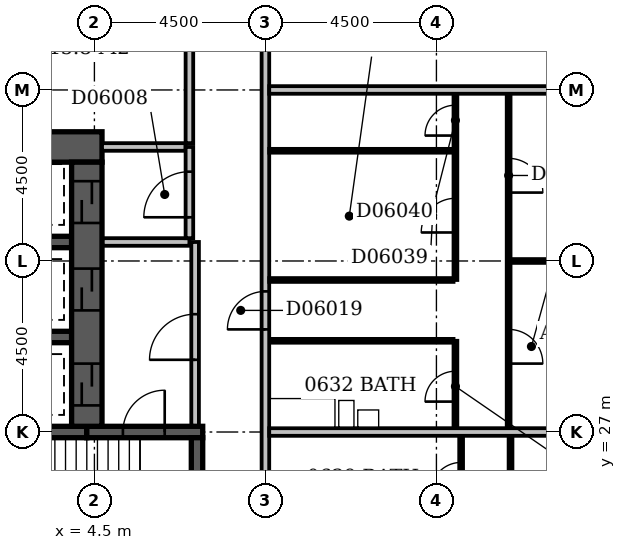
"""IFC4 building model, lengths in metres.
Left out: names, types, materials, properties, quantities, classifications, styles, units other than length and angle.
Written with IfcOpenShell. Run it as: python <this file> out.ifc"""

import sys

from ifc_helpers import new_model, si_unit, direction, frame, frame_2d, origin, place, context, subcontext, project, spatial, rectangle, extrude, element, fill, save


model = new_model("IFC4")
c1 = context("Model", 3, precision=1e-05, world=origin(), true_north=direction((0.0, 1.0)))
c2 = subcontext(c1, "Body", "Model", "MODEL_VIEW")
j1 = project(units=[si_unit("LENGTHUNIT", "METRE"), si_unit("PLANEANGLEUNIT", "RADIAN")], contexts=[c1])
p1 = place(None, origin())
s1 = spatial("IfcSite", under=j1, at=p1, CompositionType="ELEMENT")
p2 = place(p1, origin())
s2 = spatial("IfcBuilding", under=s1, at=p2, CompositionType="ELEMENT")
p3 = place(p2, frame((0.0, 0.0, 32.6)))
s3 = spatial("IfcBuildingStorey", under=s2, at=p3, CompositionType="ELEMENT", Elevation=32.6)
p4 = place(p3, frame((0.1, 34.5, -0.3), z_axis=(0.0, 0.0, 1.0), x_axis=(1.0, 0.0, 0.0)))
e1 = element("IfcWall", 1, at=p4, inside=s3, PredefinedType="SHEAR", context=c2, shape_type="SweptSolid", body=[
    extrude(rectangle(XDim=4.6, YDim=0.8, at=frame_2d((2.3, 0.0))), origin(), (0.0, 0.0, 1.0), 3.6),
])
p5 = place(p3, frame((0.35, 27.0, -0.3), z_axis=(0.0, 0.0, 1.0), x_axis=(1.0, 0.0, 0.0)))
e2 = element("IfcWall", 2, at=p5, inside=s3, PredefinedType="SHEAR", context=c2, shape_type="SweptSolid", body=[
    extrude(rectangle(XDim=3.95, YDim=0.3, at=frame_2d((1.975, 0.0))), origin(), (0.0, 0.0, 1.0), 3.6),
])
for number, where, z_axis, x_axis in (
    (3, (0.9, 29.5, -0.3), (0.0, 0.0, 1.0), (1.0, 0.0, 0.0)),
    (4, (0.9, 32.0, -0.3), (0.0, 0.0, 1.0), (1.0, 0.0, 0.0)),
):
    element("IfcWall", number, at=place(p3, frame(where, z_axis=z_axis, x_axis=x_axis)), inside=s3, PredefinedType="SHEAR", context=c2, shape_type="SweptSolid", body=[
        extrude(rectangle(XDim=3.0, YDim=0.3, at=frame_2d((1.5, 0.0))), origin(), (0.0, 0.0, 1.0), 3.6),
    ])
p6 = place(p3, frame((4.3, 27.0, -0.3), z_axis=(0.0, 0.0, 1.0), x_axis=(1.0, 0.0, 0.0)))
e5 = element("IfcWall", 5, at=p6, inside=s3, PredefinedType="SHEAR", context=c2, shape_type="SweptSolid", body=[
    extrude(rectangle(XDim=3.05, YDim=0.3, at=frame_2d((1.525, 0.0))), origin(), (0.0, 0.0, 1.0), 3.6),
])
p7 = place(p6, frame((0.95, 0.0, 0.3)))
e6 = element("IfcOpeningElement", 6, at=p7, cuts=e5, PredefinedType="OPENING", context=c2, shape_type="SweptSolid", body=[
    extrude(rectangle(XDim=1.1, YDim=2.1, at=frame_2d((0.55, 1.05))), frame((0.0, 0.162, 0.0), z_axis=(0.0, -1.0, 0.0), x_axis=(1.0, 0.0, 0.0)), (0.0, 0.0, 1.0), 0.324),
])
p8 = place(p3, frame((4.3, 27.15, -0.3), z_axis=(0.0, 0.0, 1.0), x_axis=(0.0, 1.0, 0.0)))
e7 = element("IfcWall", 7, at=p8, inside=s3, PredefinedType="SHEAR", context=c2, shape_type="SweptSolid", body=[
    extrude(rectangle(XDim=6.95, YDim=0.8, at=frame_2d((3.475, 0.0))), origin(), (0.0, 0.0, 1.0), 3.6),
])
p9 = place(p8, frame((3.05, 0.0, 0.3)))
e8 = element("IfcOpeningElement", 8, at=p9, cuts=e7, PredefinedType="OPENING", context=c2, shape_type="SweptSolid", body=[
    extrude(rectangle(XDim=1.1, YDim=2.1, at=frame_2d((0.55, 1.05))), frame((0.0, 0.412, 0.0), z_axis=(0.0, -1.0, 0.0), x_axis=(1.0, 0.0, 0.0)), (0.0, 0.0, 1.0), 0.824),
])
p10 = place(p8, frame((0.55, 0.0, 0.3)))
e9 = element("IfcOpeningElement", 9, at=p10, cuts=e7, PredefinedType="OPENING", context=c2, shape_type="SweptSolid", body=[
    extrude(rectangle(XDim=1.1, YDim=2.1, at=frame_2d((0.55, 1.05))), frame((0.0, 0.412, 0.0), z_axis=(0.0, -1.0, 0.0), x_axis=(1.0, 0.0, 0.0)), (0.0, 0.0, 1.0), 0.824),
])
p11 = place(p8, frame((5.35, 0.0, 0.3)))
e10 = element("IfcOpeningElement", 10, at=p11, cuts=e7, PredefinedType="OPENING", context=c2, shape_type="SweptSolid", body=[
    extrude(rectangle(XDim=1.1, YDim=2.1, at=frame_2d((0.55, 1.05))), frame((0.0, 0.412, 0.0), z_axis=(0.0, -1.0, 0.0), x_axis=(1.0, 0.0, 0.0)), (0.0, 0.0, 1.0), 0.824),
])
p12 = place(p3, frame((7.2, 22.65, -0.3), z_axis=(0.0, 0.0, 1.0), x_axis=(0.0, 1.0, 0.0)))
e11 = element("IfcWall", 11, at=p12, inside=s3, PredefinedType="SHEAR", context=c2, shape_type="SweptSolid", body=[
    extrude(rectangle(XDim=4.2, YDim=0.3, at=frame_2d((2.1, 0.0))), origin(), (0.0, 0.0, 1.0), 3.6),
])
p13 = place(p12, frame((0.8, 0.0, 0.3)))
e12 = element("IfcOpeningElement", 12, at=p13, cuts=e11, PredefinedType="OPENING", context=c2, shape_type="SweptSolid", body=[
    extrude(rectangle(XDim=1.1, YDim=2.1, at=frame_2d((0.55, 1.05))), frame((0.0, 0.162, 0.0), z_axis=(0.0, -1.0, 0.0), x_axis=(1.0, 0.0, 0.0)), (0.0, 0.0, 1.0), 0.324),
])
p14 = place(p3, frame((4.72, 32.0, 0.0), z_axis=(0.0, 0.0, 1.0), x_axis=(1.0, 0.0, 0.0)))
e13 = element("IfcWall", 13, at=p14, inside=s3, PredefinedType="PARTITIONING", context=c2, shape_type="SweptSolid", body=[
    extrude(rectangle(XDim=2.28, YDim=0.2, at=frame_2d((1.14, 0.0))), origin(), (0.0, 0.0, 1.0), 3.3),
])
p15 = place(p3, frame((7.0, 32.1, 0.0), z_axis=(0.0, 0.0, 1.0), x_axis=(0.0, 1.0, 0.0)))
e14 = element("IfcWall", 14, at=p15, inside=s3, PredefinedType="PARTITIONING", context=c2, shape_type="SweptSolid", body=[
    extrude(rectangle(XDim=2.4, YDim=0.2, at=frame_2d((1.2, 0.0))), origin(), (0.0, 0.0, 1.0), 3.3),
])
p16 = place(p15, frame((0.55, 0.0, 0.0)))
e15 = element("IfcOpeningElement", 15, at=p16, cuts=e14, PredefinedType="OPENING", context=c2, shape_type="SweptSolid", body=[
    extrude(rectangle(XDim=1.2, YDim=2.1, at=frame_2d((0.6, 1.05))), frame((0.0, 0.112, 0.0), z_axis=(0.0, -1.0, 0.0), x_axis=(1.0, 0.0, 0.0)), (0.0, 0.0, 1.0), 0.224),
])
p17 = place(p3, frame((4.7, 34.5, 0.0), z_axis=(0.0, 0.0, 1.0), x_axis=(1.0, 0.0, 0.0)))
e16 = element("IfcWall", 16, at=p17, inside=s3, PredefinedType="PARTITIONING", context=c2, shape_type="SweptSolid", body=[
    extrude(rectangle(XDim=2.2, YDim=0.2, at=frame_2d((1.1, 0.0))), origin(), (0.0, 0.0, 1.0), 3.3),
])
p18 = place(p3, frame((7.15, 27.17, 0.0), z_axis=(0.0, 0.0, 1.0), x_axis=(0.0, 1.0, 0.0)))
e17 = element("IfcWall", 17, at=p18, inside=s3, PredefinedType="PARTITIONING", context=c2, shape_type="SweptSolid", body=[
    extrude(rectangle(XDim=4.83, YDim=0.2, at=frame_2d((2.415, 0.0))), origin(), (0.0, 0.0, 1.0), 3.3),
])
p19 = place(p18, frame((1.73, 0.0, 0.0)))
e18 = element("IfcOpeningElement", 18, at=p19, cuts=e17, PredefinedType="OPENING", context=c2, shape_type="SweptSolid", body=[
    extrude(rectangle(XDim=1.2, YDim=2.1, at=frame_2d((0.6, 1.05))), frame((0.0, 0.112, 0.0), z_axis=(0.0, -1.0, 0.0), x_axis=(1.0, 0.0, 0.0)), (0.0, 0.0, 1.0), 0.224),
])
p20 = place(p3, frame((9.0, 5.0, 0.0), z_axis=(0.0, 0.0, 1.0), x_axis=(0.0, 1.0, 0.0)))
e19 = element("IfcWall", 19, at=p20, inside=s3, PredefinedType="PARTITIONING", context=c2, shape_type="SweptSolid", body=[
    extrude(rectangle(XDim=44.5, YDim=0.2, at=frame_2d((22.25, 0.0))), origin(), (0.0, 0.0, 1.0), 3.3),
])
p21 = place(p20, frame((24.7, 0.0, 0.0)))
e20 = element("IfcOpeningElement", 20, at=p21, cuts=e19, PredefinedType="OPENING", context=c2, shape_type="SweptSolid", body=[
    extrude(rectangle(XDim=1.0, YDim=2.1, at=frame_2d((0.5, 1.05))), frame((0.0, 0.112, 0.0), z_axis=(0.0, -1.0, 0.0), x_axis=(1.0, 0.0, 0.0)), (0.0, 0.0, 1.0), 0.224),
])
p22 = place(p20, frame((13.3, 0.0, 0.0)))
e21 = element("IfcOpeningElement", 21, at=p22, cuts=e19, PredefinedType="OPENING", context=c2, shape_type="SweptSolid", body=[
    extrude(rectangle(XDim=1.0, YDim=2.1, at=frame_2d((0.5, 1.05))), frame((0.0, 0.112, 0.0), z_axis=(0.0, -1.0, 0.0), x_axis=(1.0, 0.0, 0.0)), (0.0, 0.0, 1.0), 0.224),
])
p23 = place(p20, frame((10.45, 0.0, 0.0)))
e22 = element("IfcOpeningElement", 22, at=p23, cuts=e19, PredefinedType="OPENING", context=c2, shape_type="SweptSolid", body=[
    extrude(rectangle(XDim=1.0, YDim=2.1, at=frame_2d((0.5, 1.05))), frame((0.0, 0.112, 0.0), z_axis=(0.0, -1.0, 0.0), x_axis=(1.0, 0.0, 0.0)), (0.0, 0.0, 1.0), 0.224),
])
p24 = place(p20, frame((5.95, 0.0, 0.0)))
e23 = element("IfcOpeningElement", 23, at=p24, cuts=e19, PredefinedType="OPENING", context=c2, shape_type="SweptSolid", body=[
    extrude(rectangle(XDim=1.0, YDim=2.1, at=frame_2d((0.5, 1.05))), frame((0.0, 0.112, 0.0), z_axis=(0.0, -1.0, 0.0), x_axis=(1.0, 0.0, 0.0)), (0.0, 0.0, 1.0), 0.224),
])
p25 = place(p20, frame((37.25, 0.0, 0.0)))
e24 = element("IfcOpeningElement", 24, at=p25, cuts=e19, PredefinedType="OPENING", context=c2, shape_type="SweptSolid", body=[
    extrude(rectangle(XDim=0.9, YDim=2.1, at=frame_2d((0.45, 1.05))), frame((0.0, 0.112, 0.0), z_axis=(0.0, -1.0, 0.0), x_axis=(1.0, 0.0, 0.0)), (0.0, 0.0, 1.0), 0.224),
])
p26 = place(p20, frame((1.5, 0.0, 0.0)))
e25 = element("IfcOpeningElement", 25, at=p26, cuts=e19, PredefinedType="OPENING", context=c2, shape_type="SweptSolid", body=[
    extrude(rectangle(XDim=0.9, YDim=2.1, at=frame_2d((0.45, 1.05))), frame((0.0, 0.112, 0.0), z_axis=(0.0, -1.0, 0.0), x_axis=(1.0, 0.0, 0.0)), (0.0, 0.0, 1.0), 0.224),
])
p27 = place(p3, frame((15.45, 18.1, 0.0), z_axis=(0.0, 0.0, 1.0), x_axis=(0.0, 1.0, 0.0)))
e26 = element("IfcWall", 26, at=p27, inside=s3, PredefinedType="PARTITIONING", context=c2, shape_type="SweptSolid", body=[
    extrude(rectangle(XDim=8.8, YDim=0.1, at=frame_2d((4.4, 0.0))), origin(), (0.0, 0.0, 1.0), 3.3),
])
p28 = place(p27, frame((1.7, 0.0, 0.0)))
e27 = element("IfcOpeningElement", 27, at=p28, cuts=e26, PredefinedType="OPENING", context=c2, shape_type="SweptSolid", body=[
    extrude(rectangle(XDim=0.9, YDim=2.1, at=frame_2d((0.45, 1.05))), frame((0.0, 0.062, 0.0), z_axis=(0.0, -1.0, 0.0), x_axis=(1.0, 0.0, 0.0)), (0.0, 0.0, 1.0), 0.124),
])
p29 = place(p27, frame((6.2, 0.0, 0.0)))
e28 = element("IfcOpeningElement", 28, at=p29, cuts=e26, PredefinedType="OPENING", context=c2, shape_type="SweptSolid", body=[
    extrude(rectangle(XDim=0.9, YDim=2.1, at=frame_2d((0.45, 1.05))), frame((0.0, 0.062, 0.0), z_axis=(0.0, -1.0, 0.0), x_axis=(1.0, 0.0, 0.0)), (0.0, 0.0, 1.0), 0.124),
])
p30 = place(p3, frame((14.15, 19.6, 0.0), z_axis=(0.0, 0.0, 1.0), x_axis=(0.0, 1.0, 0.0)))
e29 = element("IfcWall", 29, at=p30, inside=s3, PredefinedType="PARTITIONING", context=c2, shape_type="SweptSolid", body=[
    extrude(rectangle(XDim=7.3, YDim=0.1, at=frame_2d((3.65, 0.0))), origin(), (0.0, 0.0, 1.0), 3.3),
])
p31 = place(p30, frame((5.8, 0.0, 0.0)))
e30 = element("IfcOpeningElement", 30, at=p31, cuts=e29, PredefinedType="OPENING", context=c2, shape_type="SweptSolid", body=[
    extrude(rectangle(XDim=0.8, YDim=2.1, at=frame_2d((0.4, 1.05))), frame((0.0, 0.062, 0.0), z_axis=(0.0, -1.0, 0.0), x_axis=(1.0, 0.0, 0.0)), (0.0, 0.0, 1.0), 0.124),
])
p32 = place(p30, frame((2.05, 0.0, 0.0)))
e31 = element("IfcOpeningElement", 31, at=p32, cuts=e29, PredefinedType="OPENING", context=c2, shape_type="SweptSolid", body=[
    extrude(rectangle(XDim=0.9, YDim=2.1, at=frame_2d((0.45, 1.05))), frame((0.0, 0.062, 0.0), z_axis=(0.0, -1.0, 0.0), x_axis=(1.0, 0.0, 0.0)), (0.0, 0.0, 1.0), 0.124),
])
p33 = place(p3, frame((9.1, 27.0, 0.0), z_axis=(0.0, 0.0, 1.0), x_axis=(1.0, 0.0, 0.0)))
e32 = element("IfcWall", 32, at=p33, inside=s3, PredefinedType="PARTITIONING", context=c2, shape_type="SweptSolid", body=[
    extrude(rectangle(XDim=12.8, YDim=0.2, at=frame_2d((6.4, 0.0))), origin(), (0.0, 0.0, 1.0), 2.7),
])
p34 = place(p3, frame((14.0, 27.1, 0.0), z_axis=(0.0, 0.0, 1.0), x_axis=(0.0, 1.0, 0.0)))
e33 = element("IfcWall", 33, at=p34, inside=s3, PredefinedType="PARTITIONING", context=c2, shape_type="SweptSolid", body=[
    extrude(rectangle(XDim=2.3, YDim=0.1, at=frame_2d((1.15, 0.0))), origin(), (0.0, 0.0, 1.0), 3.3),
])
p35 = place(p34, frame((0.7, 0.0, 0.0)))
e34 = element("IfcOpeningElement", 34, at=p35, cuts=e33, PredefinedType="OPENING", context=c2, shape_type="SweptSolid", body=[
    extrude(rectangle(XDim=0.8, YDim=2.1, at=frame_2d((0.4, 1.05))), frame((0.0, 0.062, 0.0), z_axis=(0.0, -1.0, 0.0), x_axis=(1.0, 0.0, 0.0)), (0.0, 0.0, 1.0), 0.124),
])
p36 = place(p3, frame((15.4, 27.1, 0.0), z_axis=(0.0, 0.0, 1.0), x_axis=(0.0, 1.0, 0.0)))
e35 = element("IfcWall", 35, at=p36, inside=s3, PredefinedType="PARTITIONING", context=c2, shape_type="SweptSolid", body=[
    extrude(rectangle(XDim=8.8, YDim=0.1, at=frame_2d((4.4, 0.0))), origin(), (0.0, 0.0, 1.0), 3.3),
])
p37 = place(p36, frame((1.7, 0.0, 0.0)))
e36 = element("IfcOpeningElement", 36, at=p37, cuts=e35, PredefinedType="OPENING", context=c2, shape_type="SweptSolid", body=[
    extrude(rectangle(XDim=0.9, YDim=2.1, at=frame_2d((0.45, 1.05))), frame((0.0, 0.062, 0.0), z_axis=(0.0, -1.0, 0.0), x_axis=(1.0, 0.0, 0.0)), (0.0, 0.0, 1.0), 0.124),
])
p38 = place(p36, frame((6.2, 0.0, 0.0)))
e37 = element("IfcOpeningElement", 37, at=p38, cuts=e35, PredefinedType="OPENING", context=c2, shape_type="SweptSolid", body=[
    extrude(rectangle(XDim=0.9, YDim=2.1, at=frame_2d((0.45, 1.05))), frame((0.0, 0.062, 0.0), z_axis=(0.0, -1.0, 0.0), x_axis=(1.0, 0.0, 0.0)), (0.0, 0.0, 1.0), 0.124),
])
p39 = place(p3, frame((9.1, 29.4, 0.0), z_axis=(0.0, 0.0, 1.0), x_axis=(1.0, 0.0, 0.0)))
e38 = element("IfcWall", 38, at=p39, inside=s3, PredefinedType="PLUMBINGWALL", context=c2, shape_type="SweptSolid", body=[
    extrude(rectangle(XDim=4.85, YDim=0.1, at=frame_2d((2.425, 0.0))), origin(), (0.0, 0.0, 1.0), 3.3),
])
p40 = place(p3, frame((9.1, 31.0, 0.0), z_axis=(0.0, 0.0, 1.0), x_axis=(1.0, 0.0, 0.0)))
e39 = element("IfcWall", 39, at=p40, inside=s3, PredefinedType="PARTITIONING", context=c2, shape_type="SweptSolid", body=[
    extrude(rectangle(XDim=4.85, YDim=0.1, at=frame_2d((2.425, 0.0))), origin(), (0.0, 0.0, 1.0), 3.3),
])
p41 = place(p3, frame((14.0, 31.0, 0.0), z_axis=(0.0, 0.0, 1.0), x_axis=(0.0, 1.0, 0.0)))
e40 = element("IfcWall", 40, at=p41, inside=s3, PredefinedType="PARTITIONING", context=c2, shape_type="SweptSolid", body=[
    extrude(rectangle(XDim=4.9, YDim=0.1, at=frame_2d((2.45, 0.0))), origin(), (0.0, 0.0, 1.0), 3.3),
])
p42 = place(p41, frame((1.25, 0.0, 0.0)))
e41 = element("IfcOpeningElement", 41, at=p42, cuts=e40, PredefinedType="OPENING", context=c2, shape_type="SweptSolid", body=[
    extrude(rectangle(XDim=0.9, YDim=2.1, at=frame_2d((0.45, 1.05))), frame((0.0, 0.062, 0.0), z_axis=(0.0, -1.0, 0.0), x_axis=(1.0, 0.0, 0.0)), (0.0, 0.0, 1.0), 0.124),
])
p43 = place(p41, frame((3.8, 0.0, 0.0)))
e42 = element("IfcOpeningElement", 42, at=p43, cuts=e40, PredefinedType="OPENING", context=c2, shape_type="SweptSolid", body=[
    extrude(rectangle(XDim=0.8, YDim=2.1, at=frame_2d((0.4, 1.05))), frame((0.0, 0.062, 0.0), z_axis=(0.0, -1.0, 0.0), x_axis=(1.0, 0.0, 0.0)), (0.0, 0.0, 1.0), 0.124),
])
p44 = place(p3, frame((15.45, 31.5, 0.0), z_axis=(0.0, 0.0, 1.0), x_axis=(1.0, 0.0, 0.0)))
e43 = element("IfcWall", 43, at=p44, inside=s3, PredefinedType="PARTITIONING", context=c2, shape_type="SweptSolid", body=[
    extrude(rectangle(XDim=6.45, YDim=0.1, at=frame_2d((3.225, 0.0))), origin(), (0.0, 0.0, 1.0), 3.3),
])
p45 = place(p3, frame((9.1, 34.4, 0.0), z_axis=(0.0, 0.0, 1.0), x_axis=(1.0, 0.0, 0.0)))
e44 = element("IfcWall", 44, at=p45, inside=s3, PredefinedType="PARTITIONING", context=c2, shape_type="SweptSolid", body=[
    extrude(rectangle(XDim=4.85, YDim=0.1, at=frame_2d((2.425, 0.0))), origin(), (0.0, 0.0, 1.0), 3.3),
])
p46 = place(p3, frame((7.0, 34.6, 0.0), z_axis=(0.0, 0.0, 1.0), x_axis=(0.0, 1.0, 0.0)))
e45 = element("IfcWall", 45, at=p46, inside=s3, PredefinedType="PARTITIONING", context=c2, shape_type="SweptSolid", body=[
    extrude(rectangle(XDim=14.8, YDim=0.2, at=frame_2d((7.4, 0.0))), origin(), (0.0, 0.0, 1.0), 3.3),
])
p47 = place(p46, frame((6.95, 0.0, 0.0)))
e46 = element("IfcOpeningElement", 46, at=p47, cuts=e45, PredefinedType="OPENING", context=c2, shape_type="SweptSolid", body=[
    extrude(rectangle(XDim=0.9, YDim=2.1, at=frame_2d((0.45, 1.05))), frame((0.0, 0.112, 0.0), z_axis=(0.0, -1.0, 0.0), x_axis=(1.0, 0.0, 0.0)), (0.0, 0.0, 1.0), 0.224),
])
p48 = place(p3, frame((9.1, 36.0, 0.0), z_axis=(0.0, 0.0, 1.0), x_axis=(1.0, 0.0, 0.0)))
e47 = element("IfcWall", 47, at=p48, inside=s3, PredefinedType="PARTITIONING", context=c2, shape_type="SweptSolid", body=[
    extrude(rectangle(XDim=12.8, YDim=0.2, at=frame_2d((6.4, 0.0))), origin(), (0.0, 0.0, 1.0), 2.4),
])
p49 = place(p19, origin())
e48 = element("IfcDoor", 48, at=p49, inside=s3, OperationType="SINGLE_SWING_LEFT", PredefinedType="DOOR", context=c2, shape_type="SweptSolid", body=[
    extrude(rectangle(XDim=1.2, YDim=2.1, at=frame_2d((0.6, 1.05))), frame((0.0, 0.025, 0.0), z_axis=(0.0, -1.0, 0.0), x_axis=(1.0, 0.0, 0.0)), (0.0, 0.0, 1.0), 0.05),
])
fill(e18, e48)
p50 = place(p9, origin())
e49 = element("IfcDoor", 49, at=p50, inside=s3, OperationType="SLIDING_TO_LEFT", PredefinedType="DOOR", context=c2, shape_type="SweptSolid", body=[
    extrude(rectangle(XDim=1.1, YDim=2.1, at=frame_2d((0.55, 1.05))), frame((0.0, 0.025, 0.0), z_axis=(0.0, -1.0, 0.0), x_axis=(1.0, 0.0, 0.0)), (0.0, 0.0, 1.0), 0.05),
])
fill(e8, e49)
p51 = place(p10, origin())
e50 = element("IfcDoor", 50, at=p51, inside=s3, OperationType="SLIDING_TO_LEFT", PredefinedType="DOOR", context=c2, shape_type="SweptSolid", body=[
    extrude(rectangle(XDim=1.1, YDim=2.1, at=frame_2d((0.55, 1.05))), frame((0.0, 0.025, 0.0), z_axis=(0.0, -1.0, 0.0), x_axis=(1.0, 0.0, 0.0)), (0.0, 0.0, 1.0), 0.05),
])
fill(e9, e50)
p52 = place(p16, origin())
e51 = element("IfcDoor", 51, at=p52, inside=s3, OperationType="SINGLE_SWING_LEFT", PredefinedType="DOOR", context=c2, shape_type="SweptSolid", body=[
    extrude(rectangle(XDim=1.2, YDim=2.1, at=frame_2d((0.6, 1.05))), frame((0.0, 0.025, 0.0), z_axis=(0.0, -1.0, 0.0), x_axis=(1.0, 0.0, 0.0)), (0.0, 0.0, 1.0), 0.05),
])
fill(e15, e51)
p53 = place(p11, origin())
e52 = element("IfcDoor", 52, at=p53, inside=s3, OperationType="SLIDING_TO_LEFT", PredefinedType="DOOR", context=c2, shape_type="SweptSolid", body=[
    extrude(rectangle(XDim=1.1, YDim=2.1, at=frame_2d((0.55, 1.05))), frame((0.0, 0.025, 0.0), z_axis=(0.0, -1.0, 0.0), x_axis=(1.0, 0.0, 0.0)), (0.0, 0.0, 1.0), 0.05),
])
fill(e10, e52)
p54 = place(p7, frame((1.1, 0.0, 0.0), z_axis=(0.0, 0.0, 1.0), x_axis=(-1.0, 0.0, 0.0)))
e53 = element("IfcDoor", 53, at=p54, inside=s3, OperationType="SINGLE_SWING_LEFT", PredefinedType="DOOR", context=c2, shape_type="SweptSolid", body=[
    extrude(rectangle(XDim=1.1, YDim=2.1, at=frame_2d((0.55, 1.05))), frame((0.0, 0.025, 0.0), z_axis=(0.0, -1.0, 0.0), x_axis=(1.0, 0.0, 0.0)), (0.0, 0.0, 1.0), 0.05),
])
fill(e6, e53)
p55 = place(p21, origin())
e54 = element("IfcDoor", 54, at=p55, inside=s3, OperationType="SINGLE_SWING_LEFT", PredefinedType="DOOR", context=c2, shape_type="SweptSolid", body=[
    extrude(rectangle(XDim=1.0, YDim=2.1, at=frame_2d((0.5, 1.05))), frame((0.0, 0.025, 0.0), z_axis=(0.0, -1.0, 0.0), x_axis=(1.0, 0.0, 0.0)), (0.0, 0.0, 1.0), 0.05),
])
fill(e20, e54)
p56 = place(p31, origin())
e55 = element("IfcDoor", 55, at=p56, inside=s3, OperationType="SINGLE_SWING_LEFT", PredefinedType="DOOR", context=c2, shape_type="SweptSolid", body=[
    extrude(rectangle(XDim=0.8, YDim=2.1, at=frame_2d((0.4, 1.05))), frame((0.0, 0.025, 0.0), z_axis=(0.0, -1.0, 0.0), x_axis=(1.0, 0.0, 0.0)), (0.0, 0.0, 1.0), 0.05),
])
fill(e30, e55)
p57 = place(p35, origin())
e56 = element("IfcDoor", 56, at=p57, inside=s3, OperationType="SINGLE_SWING_LEFT", PredefinedType="DOOR", context=c2, shape_type="SweptSolid", body=[
    extrude(rectangle(XDim=0.8, YDim=2.1, at=frame_2d((0.4, 1.05))), frame((0.0, 0.025, 0.0), z_axis=(0.0, -1.0, 0.0), x_axis=(1.0, 0.0, 0.0)), (0.0, 0.0, 1.0), 0.05),
])
fill(e34, e56)
p58 = place(p37, frame((0.9, 0.0, 0.0), z_axis=(0.0, 0.0, 1.0), x_axis=(-1.0, 0.0, 0.0)))
e57 = element("IfcDoor", 57, at=p58, inside=s3, OperationType="SINGLE_SWING_RIGHT", PredefinedType="DOOR", context=c2, shape_type="SweptSolid", body=[
    extrude(rectangle(XDim=0.9, YDim=2.1, at=frame_2d((0.45, 1.05))), frame((0.0, 0.025, 0.0), z_axis=(0.0, -1.0, 0.0), x_axis=(1.0, 0.0, 0.0)), (0.0, 0.0, 1.0), 0.05),
])
fill(e36, e57)
p59 = place(p38, frame((0.9, 0.0, 0.0), z_axis=(0.0, 0.0, 1.0), x_axis=(-1.0, 0.0, 0.0)))
e58 = element("IfcDoor", 58, at=p59, inside=s3, OperationType="SINGLE_SWING_RIGHT", PredefinedType="DOOR", context=c2, shape_type="SweptSolid", body=[
    extrude(rectangle(XDim=0.9, YDim=2.1, at=frame_2d((0.45, 1.05))), frame((0.0, 0.025, 0.0), z_axis=(0.0, -1.0, 0.0), x_axis=(1.0, 0.0, 0.0)), (0.0, 0.0, 1.0), 0.05),
])
fill(e37, e58)
p60 = place(p42, origin())
e59 = element("IfcDoor", 59, at=p60, inside=s3, OperationType="SINGLE_SWING_LEFT", PredefinedType="DOOR", context=c2, shape_type="SweptSolid", body=[
    extrude(rectangle(XDim=0.9, YDim=2.1, at=frame_2d((0.45, 1.05))), frame((0.0, 0.025, 0.0), z_axis=(0.0, -1.0, 0.0), x_axis=(1.0, 0.0, 0.0)), (0.0, 0.0, 1.0), 0.05),
])
fill(e41, e59)
p61 = place(p43, origin())
e60 = element("IfcDoor", 60, at=p61, inside=s3, OperationType="SINGLE_SWING_LEFT", PredefinedType="DOOR", context=c2, shape_type="SweptSolid", body=[
    extrude(rectangle(XDim=0.8, YDim=2.1, at=frame_2d((0.4, 1.05))), frame((0.0, 0.025, 0.0), z_axis=(0.0, -1.0, 0.0), x_axis=(1.0, 0.0, 0.0)), (0.0, 0.0, 1.0), 0.05),
])
fill(e42, e60)
save(model, sys.argv[1])
